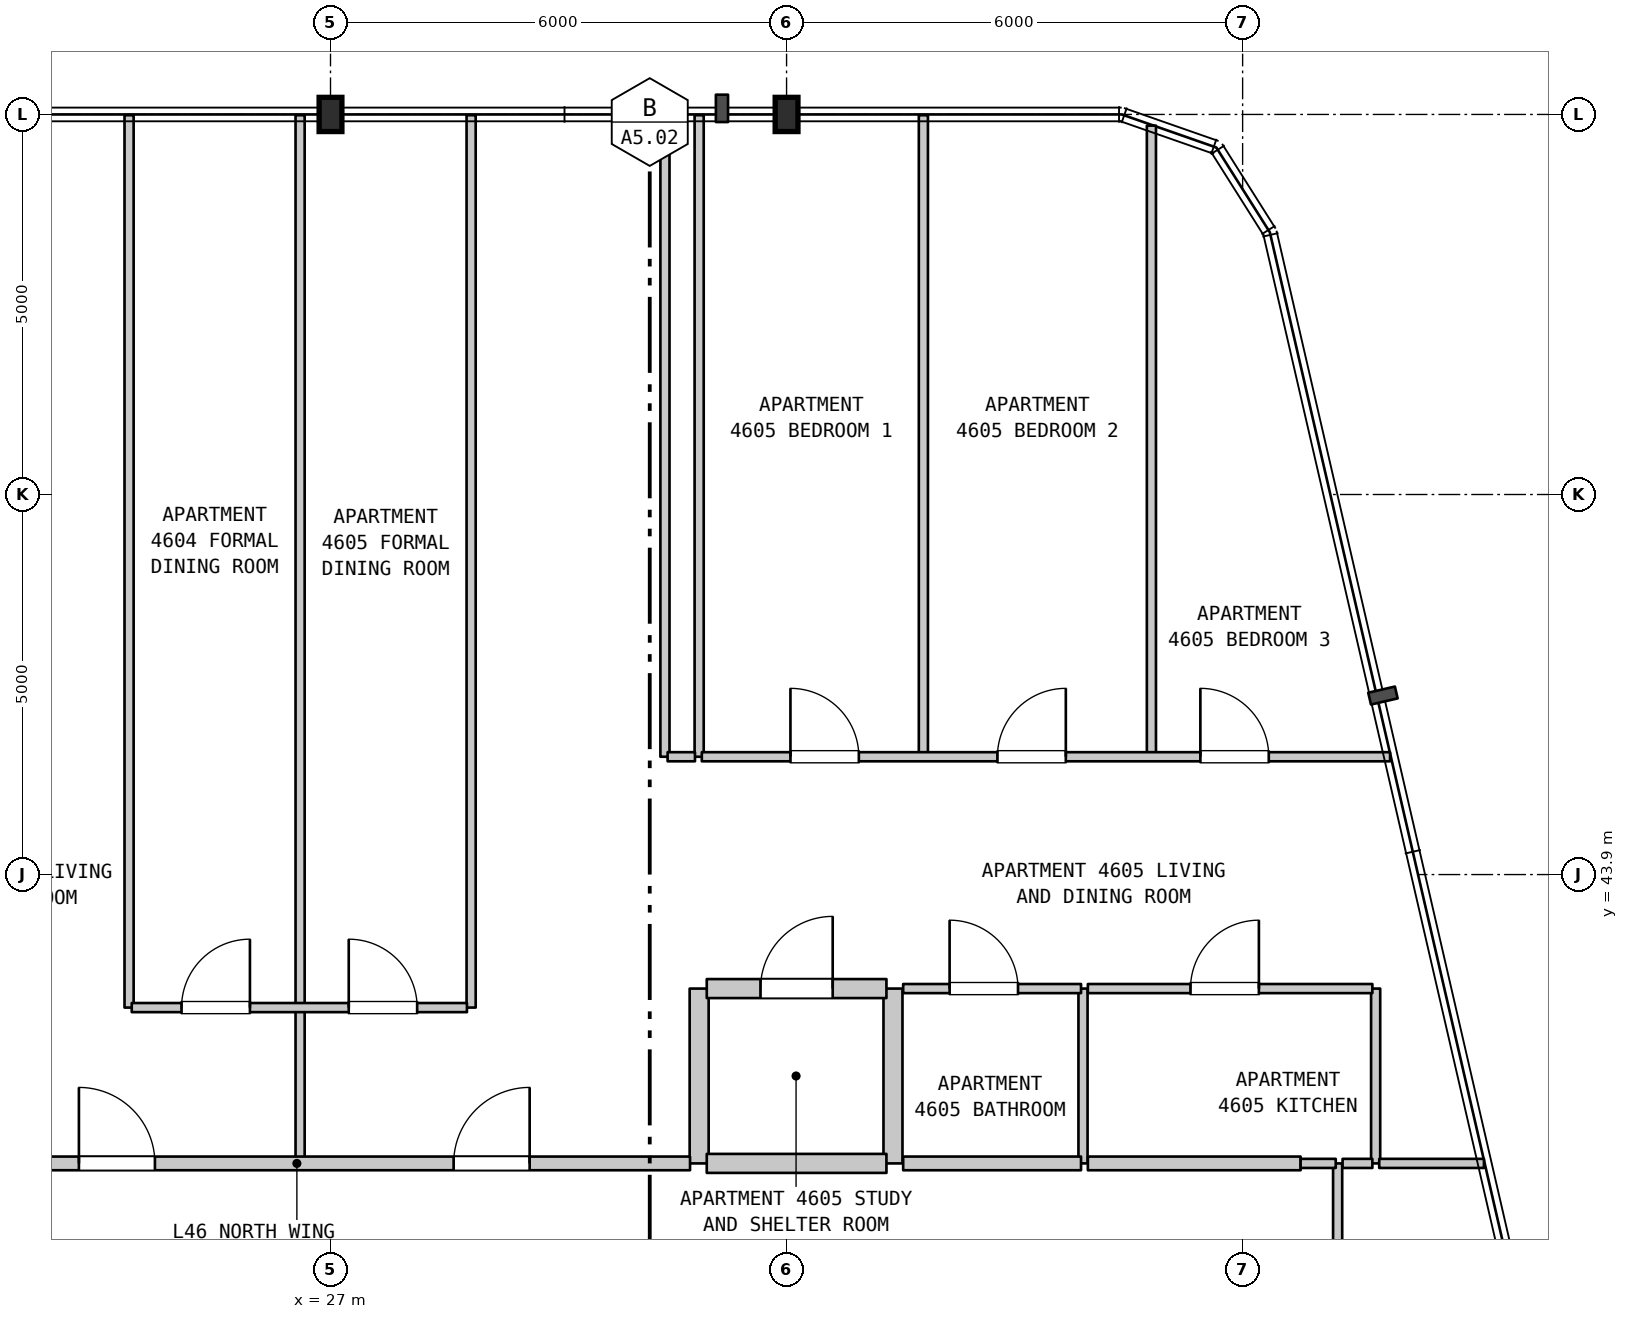
"""IFC4 building model, lengths in metres.
Left out: names, types, materials, properties, quantities, classifications, styles, units other than length and angle.
Written with IfcOpenShell. Run it as: python <this file> out.ifc"""

import sys

from ifc_helpers import new_model, si_unit, direction, frame, frame_2d, origin, origin_2d, place, context, subcontext, project, spatial, rectangle, i_section, extrude, element, fill, save


model = new_model("IFC4")
c1 = context("Model", 3, precision=1e-05, world=origin(), true_north=direction((0.0, 1.0)))
c2 = subcontext(c1, "Body", "Model", "MODEL_VIEW")
j1 = project(units=[si_unit("LENGTHUNIT", "METRE"), si_unit("PLANEANGLEUNIT", "RADIAN")], contexts=[c1])
p1 = place(None, origin())
s1 = spatial("IfcSite", under=j1, at=p1, CompositionType="ELEMENT")
p2 = place(p1, origin())
s2 = spatial("IfcBuilding", under=s1, at=p2, CompositionType="ELEMENT")
p3 = place(p2, frame((0.0, 0.0, 188.4)))
s3 = spatial("IfcBuildingStorey", under=s2, at=p3, CompositionType="ELEMENT", Elevation=188.4)
for number, where, z_axis, x_axis in (
    (1, (27.0, 53.9, 0.0), (0.0, 0.0, 1.0), (1.0, 0.0, 0.0)),
    (2, (33.0, 53.9, 0.0), (0.0, 0.0, 1.0), (1.0, 0.0, 0.0)),
):
    element("IfcColumn", number, at=place(p3, frame(where, z_axis=z_axis, x_axis=x_axis)), inside=s3, PredefinedType="COLUMN", context=c2, shape_type="SweptSolid", body=[
        extrude(i_section(OverallWidth=0.3, OverallDepth=0.45, WebThickness=0.014, FlangeThickness=0.026, FilletRadius=0.027, at=origin_2d()), origin(), (0.0, 0.0, 1.0), 3.7),
    ])
p4 = place(p3, frame((24.35, 42.15, 0.0), z_axis=(0.0, 0.0, 1.0), x_axis=(0.0, 1.0, 0.0)))
e3 = element("IfcWall", 3, at=p4, inside=s3, PredefinedType="PARTITIONING", context=c2, shape_type="SweptSolid", body=[
    extrude(rectangle(XDim=11.74, YDim=0.12, at=frame_2d((5.87, 0.0))), origin(), (0.0, 0.0, 1.0), 3.39),
])
p5 = place(p3, frame((26.6, 40.1, 0.0), z_axis=(0.0, 0.0, 1.0), x_axis=(0.0, 1.0, 0.0)))
e4 = element("IfcWall", 4, at=p5, inside=s3, PredefinedType="PARTITIONING", context=c2, shape_type="SweptSolid", body=[
    extrude(rectangle(XDim=2.05, YDim=0.12, at=frame_2d((1.025, 0.0))), origin(), (0.0, 0.0, 1.0), 3.39),
])
for number, where, z_axis, x_axis in (
    (5, (26.6, 42.15, 0.0), (0.0, 0.0, 1.0), (0.0, 1.0, 0.0)),
    (6, (28.85, 42.15, 0.0), (0.0, 0.0, 1.0), (0.0, 1.0, 0.0)),
):
    element("IfcWall", number, at=place(p3, frame(where, z_axis=z_axis, x_axis=x_axis)), inside=s3, PredefinedType="PARTITIONING", context=c2, shape_type="SweptSolid", body=[
        extrude(rectangle(XDim=11.74, YDim=0.12, at=frame_2d((5.87, 0.0))), origin(), (0.0, 0.0, 1.0), 3.39),
    ])
p6 = place(p3, frame((31.4, 45.45, 0.0), z_axis=(0.0, 0.0, 1.0), x_axis=(0.0, 1.0, 0.0)))
e7 = element("IfcWall", 7, at=p6, inside=s3, PredefinedType="PARTITIONING", context=c2, shape_type="SweptSolid", body=[
    extrude(rectangle(XDim=8.44, YDim=0.12, at=frame_2d((4.22, 0.0))), origin(), (0.0, 0.0, 1.0), 3.39),
])
p7 = place(p3, frame((31.85, 40.1, 0.0), z_axis=(0.0, 0.0, 1.0), x_axis=(0.0, 1.0, 0.0)))
e8 = element("IfcWall", 8, at=p7, inside=s3, PredefinedType="STANDARD", context=c2, shape_type="SweptSolid", body=[
    extrude(rectangle(XDim=2.3, YDim=0.25, at=frame_2d((1.15, 0.0))), origin(), (0.0, 0.0, 1.0), 3.39),
])
p8 = place(p3, frame((31.85, 45.45, 0.0), z_axis=(0.0, 0.0, 1.0), x_axis=(0.0, 1.0, 0.0)))
e9 = element("IfcWall", 9, at=p8, inside=s3, PredefinedType="PARTITIONING", context=c2, shape_type="SweptSolid", body=[
    extrude(rectangle(XDim=8.44, YDim=0.12, at=frame_2d((4.22, 0.0))), origin(), (0.0, 0.0, 1.0), 3.39),
])
p9 = place(p3, frame((34.4, 40.1, 0.0), z_axis=(0.0, 0.0, 1.0), x_axis=(0.0, 1.0, 0.0)))
e10 = element("IfcWall", 10, at=p9, inside=s3, PredefinedType="STANDARD", context=c2, shape_type="SweptSolid", body=[
    extrude(rectangle(XDim=2.3, YDim=0.25, at=frame_2d((1.15, 0.0))), origin(), (0.0, 0.0, 1.0), 3.39),
])
p10 = place(p3, frame((34.8, 45.45, 0.0), z_axis=(0.0, 0.0, 1.0), x_axis=(0.0, 1.0, 0.0)))
e11 = element("IfcWall", 11, at=p10, inside=s3, PredefinedType="PARTITIONING", context=c2, shape_type="SweptSolid", body=[
    extrude(rectangle(XDim=8.44, YDim=0.12, at=frame_2d((4.22, 0.0))), origin(), (0.0, 0.0, 1.0), 3.39),
])
p11 = place(p3, frame((36.9, 40.1, 0.0), z_axis=(0.0, 0.0, 1.0), x_axis=(0.0, 1.0, 0.0)))
e12 = element("IfcWall", 12, at=p11, inside=s3, PredefinedType="PARTITIONING", context=c2, shape_type="SweptSolid", body=[
    extrude(rectangle(XDim=2.3, YDim=0.12, at=frame_2d((1.15, 0.0))), origin(), (0.0, 0.0, 1.0), 3.39),
])
p12 = place(p3, frame((37.8, 45.45, 0.0), z_axis=(0.0, 0.0, 1.0), x_axis=(0.0, 1.0, 0.0)))
e13 = element("IfcWall", 13, at=p12, inside=s3, PredefinedType="PARTITIONING", context=c2, shape_type="SweptSolid", body=[
    extrude(rectangle(XDim=8.303, YDim=0.12, at=frame_2d((4.151, 0.0))), origin(), (0.0, 0.0, 1.0), 3.39),
])
p13 = place(p3, frame((40.25, 37.9, 0.0), z_axis=(0.0, 0.0, 1.0), x_axis=(0.0, 1.0, 0.0)))
e14 = element("IfcWall", 14, at=p13, inside=s3, PredefinedType="PARTITIONING", context=c2, shape_type="SweptSolid", body=[
    extrude(rectangle(XDim=2.2, YDim=0.12, at=frame_2d((1.1, 0.0))), origin(), (0.0, 0.0, 1.0), 3.39),
])
p14 = place(p3, frame((40.75, 40.1, 0.0), z_axis=(0.0, 0.0, 1.0), x_axis=(0.0, 1.0, 0.0)))
e15 = element("IfcWall", 15, at=p14, inside=s3, PredefinedType="PARTITIONING", context=c2, shape_type="SweptSolid", body=[
    extrude(rectangle(XDim=2.3, YDim=0.12, at=frame_2d((1.15, 0.0))), origin(), (0.0, 0.0, 1.0), 3.39),
])
p15 = place(p3, frame((21.385, 40.1, 0.0), z_axis=(0.0, 0.0, 1.0), x_axis=(1.0, 0.0, 0.0)))
e16 = element("IfcWall", 16, at=p15, inside=s3, PredefinedType="STANDARD", context=c2, shape_type="SweptSolid", body=[
    extrude(rectangle(XDim=10.345, YDim=0.18, at=frame_2d((5.172, 0.0))), origin(), (0.0, 0.0, 1.0), 3.39),
])
p16 = place(p15, frame((2.305, 0.0, 0.0)))
e17 = element("IfcOpeningElement", 17, at=p16, cuts=e16, PredefinedType="OPENING", context=c2, shape_type="SweptSolid", body=[
    extrude(rectangle(XDim=1.0, YDim=2.15, at=frame_2d((0.5, 1.075))), frame((0.0, 0.1, 0.0), z_axis=(0.0, -1.0, 0.0), x_axis=(1.0, 0.0, 0.0)), (0.0, 0.0, 1.0), 0.2),
])
p17 = place(p15, frame((7.235, 0.0, 0.0)))
e18 = element("IfcOpeningElement", 18, at=p17, cuts=e16, PredefinedType="OPENING", context=c2, shape_type="SweptSolid", body=[
    extrude(rectangle(XDim=1.0, YDim=2.15, at=frame_2d((0.5, 1.075))), frame((0.0, 0.1, 0.0), z_axis=(0.0, -1.0, 0.0), x_axis=(1.0, 0.0, 0.0)), (0.0, 0.0, 1.0), 0.2),
])
p18 = place(p3, frame((31.95, 40.1, 0.0), z_axis=(0.0, 0.0, 1.0), x_axis=(1.0, 0.0, 0.0)))
e19 = element("IfcWall", 19, at=p18, inside=s3, PredefinedType="STANDARD", context=c2, shape_type="SweptSolid", body=[
    extrude(rectangle(XDim=2.364, YDim=0.25, at=frame_2d((1.182, 0.0))), origin(), (0.0, 0.0, 1.0), 3.39),
])
p19 = place(p3, frame((34.534, 40.1, 0.0), z_axis=(0.0, 0.0, 1.0), x_axis=(1.0, 0.0, 0.0)))
e20 = element("IfcWall", 20, at=p19, inside=s3, PredefinedType="STANDARD", context=c2, shape_type="SweptSolid", body=[
    extrude(rectangle(XDim=2.34, YDim=0.18, at=frame_2d((1.17, 0.0))), origin(), (0.0, 0.0, 1.0), 3.39),
])
p20 = place(p3, frame((36.964, 40.1, 0.0), z_axis=(0.0, 0.0, 1.0), x_axis=(1.0, 0.0, 0.0)))
e21 = element("IfcWall", 21, at=p20, inside=s3, PredefinedType="STANDARD", context=c2, shape_type="SweptSolid", body=[
    extrude(rectangle(XDim=2.799, YDim=0.18, at=frame_2d((1.399, 0.0))), origin(), (0.0, 0.0, 1.0), 3.39),
])
p21 = place(p3, frame((39.763, 40.1, 0.0), z_axis=(0.0, 0.0, 1.0), x_axis=(1.0, 0.0, 0.0)))
e22 = element("IfcWall", 22, at=p21, inside=s3, PredefinedType="PARTITIONING", context=c2, shape_type="SweptSolid", body=[
    extrude(rectangle(XDim=0.462, YDim=0.12, at=frame_2d((0.231, 0.0))), origin(), (0.0, 0.0, 1.0), 3.39),
])
p22 = place(p3, frame((40.315, 40.1, 0.0), z_axis=(0.0, 0.0, 1.0), x_axis=(1.0, 0.0, 0.0)))
e23 = element("IfcWall", 23, at=p22, inside=s3, PredefinedType="PARTITIONING", context=c2, shape_type="SweptSolid", body=[
    extrude(rectangle(XDim=0.392, YDim=0.12, at=frame_2d((0.196, 0.0))), origin(), (0.0, 0.0, 1.0), 3.39),
])
p23 = place(p3, frame((40.797, 40.1, 0.0), z_axis=(0.0, 0.0, 1.0), x_axis=(1.0, 0.0, 0.0)))
e24 = element("IfcWall", 24, at=p23, inside=s3, PredefinedType="PARTITIONING", context=c2, shape_type="SweptSolid", body=[
    extrude(rectangle(XDim=1.378, YDim=0.12, at=frame_2d((0.689, 0.0))), origin(), (0.0, 0.0, 1.0), 3.39),
])
p24 = place(p3, frame((24.385, 42.15, 0.0), z_axis=(0.0, 0.0, 1.0), x_axis=(1.0, 0.0, 0.0)))
e25 = element("IfcWall", 25, at=p24, inside=s3, PredefinedType="PARTITIONING", context=c2, shape_type="SweptSolid", body=[
    extrude(rectangle(XDim=4.41, YDim=0.12, at=frame_2d((2.205, 0.0))), origin(), (0.0, 0.0, 1.0), 3.39),
])
p25 = place(p24, frame((0.655, 0.0, 0.0)))
e26 = element("IfcOpeningElement", 26, at=p25, cuts=e25, PredefinedType="OPENING", context=c2, shape_type="SweptSolid", body=[
    extrude(rectangle(XDim=0.9, YDim=2.15, at=frame_2d((0.45, 1.075))), frame((0.0, 0.07, 0.0), z_axis=(0.0, -1.0, 0.0), x_axis=(1.0, 0.0, 0.0)), (0.0, 0.0, 1.0), 0.14),
])
p26 = place(p24, frame((2.855, 0.0, 0.0)))
e27 = element("IfcOpeningElement", 27, at=p26, cuts=e25, PredefinedType="OPENING", context=c2, shape_type="SweptSolid", body=[
    extrude(rectangle(XDim=0.9, YDim=2.15, at=frame_2d((0.45, 1.075))), frame((0.0, 0.07, 0.0), z_axis=(0.0, -1.0, 0.0), x_axis=(1.0, 0.0, 0.0)), (0.0, 0.0, 1.0), 0.14),
])
p27 = place(p3, frame((31.95, 42.4, 0.0), z_axis=(0.0, 0.0, 1.0), x_axis=(1.0, 0.0, 0.0)))
e28 = element("IfcWall", 28, at=p27, inside=s3, PredefinedType="STANDARD", context=c2, shape_type="SweptSolid", body=[
    extrude(rectangle(XDim=2.364, YDim=0.25, at=frame_2d((1.182, 0.0))), origin(), (0.0, 0.0, 1.0), 3.39),
])
p28 = place(p27, frame((0.707, 0.0, 0.0)))
e29 = element("IfcOpeningElement", 29, at=p28, cuts=e28, PredefinedType="OPENING", context=c2, shape_type="SweptSolid", body=[
    extrude(rectangle(XDim=0.95, YDim=2.15, at=frame_2d((0.475, 1.075))), frame((0.0, 0.135, 0.0), z_axis=(0.0, -1.0, 0.0), x_axis=(1.0, 0.0, 0.0)), (0.0, 0.0, 1.0), 0.27),
])
p29 = place(p3, frame((34.534, 42.4, 0.0), z_axis=(0.0, 0.0, 1.0), x_axis=(1.0, 0.0, 0.0)))
e30 = element("IfcWall", 30, at=p29, inside=s3, PredefinedType="PARTITIONING", context=c2, shape_type="SweptSolid", body=[
    extrude(rectangle(XDim=2.34, YDim=0.12, at=frame_2d((1.17, 0.0))), origin(), (0.0, 0.0, 1.0), 3.39),
])
p30 = place(p29, frame((0.611, 0.0, 0.0)))
e31 = element("IfcOpeningElement", 31, at=p30, cuts=e30, PredefinedType="OPENING", context=c2, shape_type="SweptSolid", body=[
    extrude(rectangle(XDim=0.9, YDim=2.1, at=frame_2d((0.45, 1.05))), frame((0.0, 0.07, 0.0), z_axis=(0.0, -1.0, 0.0), x_axis=(1.0, 0.0, 0.0)), (0.0, 0.0, 1.0), 0.14),
])
p31 = place(p3, frame((36.964, 42.4, 0.0), z_axis=(0.0, 0.0, 1.0), x_axis=(1.0, 0.0, 0.0)))
e32 = element("IfcWall", 32, at=p31, inside=s3, PredefinedType="PARTITIONING", context=c2, shape_type="SweptSolid", body=[
    extrude(rectangle(XDim=3.743, YDim=0.12, at=frame_2d((1.872, 0.0))), origin(), (0.0, 0.0, 1.0), 3.39),
])
p32 = place(p31, frame((1.35, 0.0, 0.0)))
e33 = element("IfcOpeningElement", 33, at=p32, cuts=e32, PredefinedType="OPENING", context=c2, shape_type="SweptSolid", body=[
    extrude(rectangle(XDim=0.9, YDim=2.15, at=frame_2d((0.45, 1.075))), frame((0.0, 0.07, 0.0), z_axis=(0.0, -1.0, 0.0), x_axis=(1.0, 0.0, 0.0)), (0.0, 0.0, 1.0), 0.14),
])
p33 = place(p3, frame((31.435, 45.45, 0.0), z_axis=(0.0, 0.0, 1.0), x_axis=(1.0, 0.0, 0.0)))
e34 = element("IfcWall", 34, at=p33, inside=s3, PredefinedType="PARTITIONING", context=c2, shape_type="SweptSolid", body=[
    extrude(rectangle(XDim=0.36, YDim=0.12, at=frame_2d((0.18, 0.0))), origin(), (0.0, 0.0, 1.0), 3.39),
])
p34 = place(p3, frame((31.885, 45.45, 0.0), z_axis=(0.0, 0.0, 1.0), x_axis=(1.0, 0.0, 0.0)))
e35 = element("IfcWall", 35, at=p34, inside=s3, PredefinedType="PARTITIONING", context=c2, shape_type="SweptSolid", body=[
    extrude(rectangle(XDim=9.055, YDim=0.12, at=frame_2d((4.527, 0.0))), origin(), (0.0, 0.0, 1.0), 3.39),
])
p35 = place(p34, frame((1.166, 0.0, 0.0)))
e36 = element("IfcOpeningElement", 36, at=p35, cuts=e35, PredefinedType="OPENING", context=c2, shape_type="SweptSolid", body=[
    extrude(rectangle(XDim=0.9, YDim=2.15, at=frame_2d((0.45, 1.075))), frame((0.0, 0.07, 0.0), z_axis=(0.0, -1.0, 0.0), x_axis=(1.0, 0.0, 0.0)), (0.0, 0.0, 1.0), 0.14),
])
p36 = place(p34, frame((3.889, 0.0, 0.0)))
e37 = element("IfcOpeningElement", 37, at=p36, cuts=e35, PredefinedType="OPENING", context=c2, shape_type="SweptSolid", body=[
    extrude(rectangle(XDim=0.9, YDim=2.15, at=frame_2d((0.45, 1.075))), frame((0.0, 0.07, 0.0), z_axis=(0.0, -1.0, 0.0), x_axis=(1.0, 0.0, 0.0)), (0.0, 0.0, 1.0), 0.14),
])
p37 = place(p34, frame((6.559, 0.0, 0.0)))
e38 = element("IfcOpeningElement", 38, at=p37, cuts=e35, PredefinedType="OPENING", context=c2, shape_type="SweptSolid", body=[
    extrude(rectangle(XDim=0.9, YDim=2.15, at=frame_2d((0.45, 1.075))), frame((0.0, 0.07, 0.0), z_axis=(0.0, -1.0, 0.0), x_axis=(1.0, 0.0, 0.0)), (0.0, 0.0, 1.0), 0.14),
])
p38 = place(p16, origin())
e39 = element("IfcDoor", 39, at=p38, inside=s3, OperationType="SINGLE_SWING_LEFT", PredefinedType="DOOR", context=c2, shape_type="SweptSolid", body=[
    extrude(rectangle(XDim=1.0, YDim=2.15, at=frame_2d((0.5, 1.075))), frame((0.0, 0.025, 0.0), z_axis=(0.0, -1.0, 0.0), x_axis=(1.0, 0.0, 0.0)), (0.0, 0.0, 1.0), 0.05),
])
fill(e17, e39)
p39 = place(p17, origin())
e40 = element("IfcDoor", 40, at=p39, inside=s3, OperationType="SINGLE_SWING_RIGHT", PredefinedType="DOOR", context=c2, shape_type="SweptSolid", body=[
    extrude(rectangle(XDim=1.0, YDim=2.15, at=frame_2d((0.5, 1.075))), frame((0.0, 0.025, 0.0), z_axis=(0.0, -1.0, 0.0), x_axis=(1.0, 0.0, 0.0)), (0.0, 0.0, 1.0), 0.05),
])
fill(e18, e40)
p40 = place(p25, origin())
e41 = element("IfcDoor", 41, at=p40, inside=s3, OperationType="SINGLE_SWING_RIGHT", PredefinedType="DOOR", context=c2, shape_type="SweptSolid", body=[
    extrude(rectangle(XDim=0.9, YDim=2.15, at=frame_2d((0.45, 1.075))), frame((0.0, 0.025, 0.0), z_axis=(0.0, -1.0, 0.0), x_axis=(1.0, 0.0, 0.0)), (0.0, 0.0, 1.0), 0.05),
])
fill(e26, e41)
p41 = place(p26, origin())
e42 = element("IfcDoor", 42, at=p41, inside=s3, OperationType="SINGLE_SWING_LEFT", PredefinedType="DOOR", context=c2, shape_type="SweptSolid", body=[
    extrude(rectangle(XDim=0.9, YDim=2.15, at=frame_2d((0.45, 1.075))), frame((0.0, 0.025, 0.0), z_axis=(0.0, -1.0, 0.0), x_axis=(1.0, 0.0, 0.0)), (0.0, 0.0, 1.0), 0.05),
])
fill(e27, e42)
p42 = place(p28, origin())
e43 = element("IfcDoor", 43, at=p42, inside=s3, OperationType="SINGLE_SWING_RIGHT", PredefinedType="DOOR", context=c2, shape_type="SweptSolid", body=[
    extrude(rectangle(XDim=0.95, YDim=2.15, at=frame_2d((0.475, 1.075))), frame((0.0, 0.025, 0.0), z_axis=(0.0, -1.0, 0.0), x_axis=(1.0, 0.0, 0.0)), (0.0, 0.0, 1.0), 0.05),
])
fill(e29, e43)
p43 = place(p30, origin())
e44 = element("IfcDoor", 44, at=p43, inside=s3, OperationType="SINGLE_SWING_LEFT", PredefinedType="DOOR", context=c2, shape_type="SweptSolid", body=[
    extrude(rectangle(XDim=0.9, YDim=2.1, at=frame_2d((0.45, 1.05))), frame((0.0, 0.025, 0.0), z_axis=(0.0, -1.0, 0.0), x_axis=(1.0, 0.0, 0.0)), (0.0, 0.0, 1.0), 0.05),
])
fill(e31, e44)
p44 = place(p32, origin())
e45 = element("IfcDoor", 45, at=p44, inside=s3, OperationType="SINGLE_SWING_RIGHT", PredefinedType="DOOR", context=c2, shape_type="SweptSolid", body=[
    extrude(rectangle(XDim=0.9, YDim=2.15, at=frame_2d((0.45, 1.075))), frame((0.0, 0.025, 0.0), z_axis=(0.0, -1.0, 0.0), x_axis=(1.0, 0.0, 0.0)), (0.0, 0.0, 1.0), 0.05),
])
fill(e33, e45)
p45 = place(p35, origin())
e46 = element("IfcDoor", 46, at=p45, inside=s3, OperationType="SINGLE_SWING_LEFT", PredefinedType="DOOR", context=c2, shape_type="SweptSolid", body=[
    extrude(rectangle(XDim=0.9, YDim=2.15, at=frame_2d((0.45, 1.075))), frame((0.0, 0.025, 0.0), z_axis=(0.0, -1.0, 0.0), x_axis=(1.0, 0.0, 0.0)), (0.0, 0.0, 1.0), 0.05),
])
fill(e36, e46)
p46 = place(p36, origin())
e47 = element("IfcDoor", 47, at=p46, inside=s3, OperationType="SINGLE_SWING_RIGHT", PredefinedType="DOOR", context=c2, shape_type="SweptSolid", body=[
    extrude(rectangle(XDim=0.9, YDim=2.15, at=frame_2d((0.45, 1.075))), frame((0.0, 0.025, 0.0), z_axis=(0.0, -1.0, 0.0), x_axis=(1.0, 0.0, 0.0)), (0.0, 0.0, 1.0), 0.05),
])
fill(e37, e47)
p47 = place(p37, origin())
e48 = element("IfcDoor", 48, at=p47, inside=s3, OperationType="SINGLE_SWING_LEFT", PredefinedType="DOOR", context=c2, shape_type="SweptSolid", body=[
    extrude(rectangle(XDim=0.9, YDim=2.15, at=frame_2d((0.45, 1.075))), frame((0.0, 0.025, 0.0), z_axis=(0.0, -1.0, 0.0), x_axis=(1.0, 0.0, 0.0)), (0.0, 0.0, 1.0), 0.05),
])
fill(e38, e48)
save(model, sys.argv[1])
